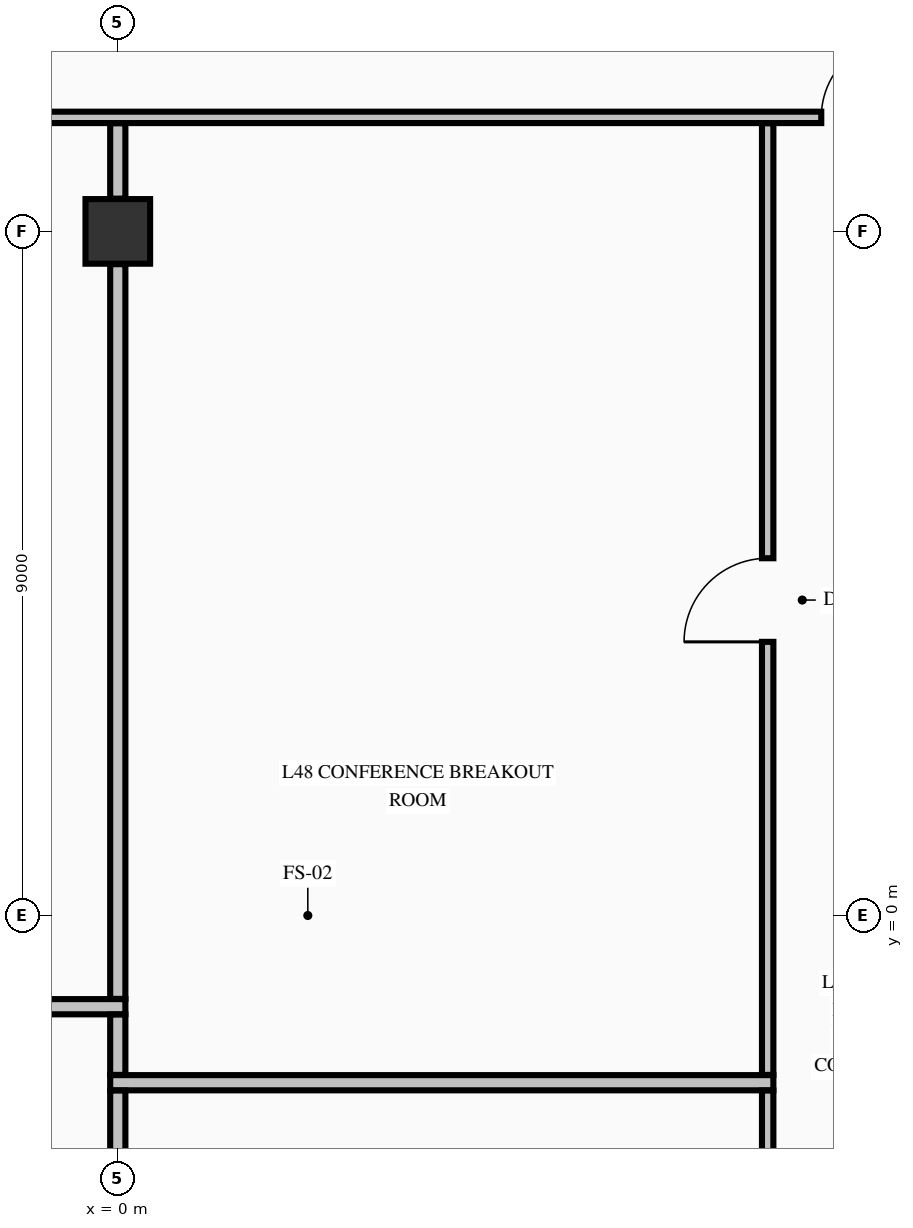
"""IFC4 building model, lengths in metres.
Left out: names, types, materials, properties, quantities, classifications, styles, units other than length and angle.
Written with IfcOpenShell. Run it as: python <this file> out.ifc"""

import sys

from ifc_helpers import new_model, si_unit, direction, frame, frame_2d, origin, origin_2d, place, context, subcontext, project, spatial, rectangle, extrude, element, fill, save


model = new_model("IFC4")
c1 = context("Model", 3, precision=1e-05, world=origin(), true_north=direction((0.0, 1.0)))
c2 = subcontext(c1, "Body", "Model", "MODEL_VIEW")
j1 = project(units=[si_unit("LENGTHUNIT", "METRE"), si_unit("PLANEANGLEUNIT", "RADIAN")], contexts=[c1])
p1 = place(None, origin())
s1 = spatial("IfcSite", under=j1, at=p1, CompositionType="ELEMENT")
p2 = place(p1, origin())
s2 = spatial("IfcBuilding", under=s1, at=p2, CompositionType="ELEMENT")
p3 = place(p2, frame((0.0, 0.0, 186.46)))
s3 = spatial("IfcBuildingStorey", under=s2, at=p3, CompositionType="ELEMENT", Elevation=186.46)
p4 = place(p3, frame((0.0, 9.0, -0.425), z_axis=(0.0, 0.0, 1.0), x_axis=(1.0, 0.0, 0.0)))
e1 = element("IfcColumn", 1, at=p4, inside=s3, PredefinedType="COLUMN", context=c2, shape_type="SweptSolid", body=[
    extrude(rectangle(XDim=0.85, YDim=0.85, at=origin_2d()), origin(), (0.0, 0.0, 1.0), 5.0),
])
for number, where, z_axis, x_axis in (
    (2, (-0.1, -2.2, 0.0), (0.0, 0.0, 1.0), (1.0, 0.0, 0.0)),
    (3, (-8.625, -1.2, 0.0), (0.0, 0.0, 1.0), (1.0, 0.0, 0.0)),
):
    element("IfcWall", number, at=place(p3, frame(where, z_axis=z_axis, x_axis=x_axis)), inside=s3, PredefinedType="PARTITIONING", context=c2, shape_type="SweptSolid", body=[
        extrude(rectangle(XDim=8.725, YDim=0.2, at=frame_2d((4.363, 0.0))), origin(), (0.0, 0.0, 1.0), 4.575),
    ])
p5 = place(p3, frame((-10.569, 10.5, 0.0), z_axis=(0.0, 0.0, 1.0), x_axis=(1.0, 0.0, 0.0)))
e4 = element("IfcWall", 4, at=p5, inside=s3, PredefinedType="PARTITIONING", context=c2, shape_type="SweptSolid", body=[
    extrude(rectangle(XDim=21.138, YDim=0.15, at=frame_2d((10.569, 0.0))), origin(), (0.0, 0.0, 1.0), 4.575),
])
p6 = place(p5, frame((0.264, 0.0, 0.0)))
e5 = element("IfcOpeningElement", 5, at=p6, cuts=e4, PredefinedType="OPENING", context=c2, shape_type="SweptSolid", body=[
    extrude(rectangle(XDim=1.05, YDim=2.15, at=frame_2d((0.525, 1.075))), frame((0.0, 0.085, 0.0), z_axis=(0.0, -1.0, 0.0), x_axis=(1.0, 0.0, 0.0)), (0.0, 0.0, 1.0), 0.17),
])
p7 = place(p5, frame((19.824, 0.0, 0.0)))
e6 = element("IfcOpeningElement", 6, at=p7, cuts=e4, PredefinedType="OPENING", context=c2, shape_type="SweptSolid", body=[
    extrude(rectangle(XDim=1.05, YDim=2.15, at=frame_2d((0.525, 1.075))), frame((0.0, 0.085, 0.0), z_axis=(0.0, -1.0, 0.0), x_axis=(1.0, 0.0, 0.0)), (0.0, 0.0, 1.0), 0.17),
])
p8 = place(p3, frame((0.0, -5.097, 0.0), z_axis=(0.0, 0.0, 1.0), x_axis=(0.0, 1.0, 0.0)))
e7 = element("IfcWall", 7, at=p8, inside=s3, PredefinedType="PARTITIONING", context=c2, shape_type="SweptSolid", body=[
    extrude(rectangle(XDim=2.794, YDim=0.2, at=frame_2d((1.397, 0.0))), origin(), (0.0, 0.0, 1.0), 3.767),
])
p9 = place(p3, frame((0.0, -2.097, 0.0), z_axis=(0.0, 0.0, 1.0), x_axis=(0.0, 1.0, 0.0)))
e8 = element("IfcWall", 8, at=p9, inside=s3, PredefinedType="PARTITIONING", context=c2, shape_type="SweptSolid", body=[
    extrude(rectangle(XDim=0.794, YDim=0.2, at=frame_2d((0.397, 0.0))), origin(), (0.0, 0.0, 1.0), 3.767),
])
p10 = place(p3, frame((0.0, -1.097, 0.0), z_axis=(0.0, 0.0, 1.0), x_axis=(0.0, 1.0, 0.0)))
e9 = element("IfcWall", 9, at=p10, inside=s3, PredefinedType="PARTITIONING", context=c2, shape_type="SweptSolid", body=[
    extrude(rectangle(XDim=9.666, YDim=0.2, at=frame_2d((4.833, 0.0))), origin(), (0.0, 0.0, 1.0), 3.767),
])
p11 = place(p3, frame((0.0, 9.431, 0.0), z_axis=(0.0, 0.0, 1.0), x_axis=(0.0, 1.0, 0.0)))
e10 = element("IfcWall", 10, at=p11, inside=s3, PredefinedType="PARTITIONING", context=c2, shape_type="SweptSolid", body=[
    extrude(rectangle(XDim=0.991, YDim=0.2, at=frame_2d((0.496, 0.0))), origin(), (0.0, 0.0, 1.0), 2.167),
])
p12 = place(p3, frame((8.55, -5.097, 0.0), z_axis=(0.0, 0.0, 1.0), x_axis=(0.0, 1.0, 0.0)))
e11 = element("IfcWall", 11, at=p12, inside=s3, PredefinedType="PARTITIONING", context=c2, shape_type="SweptSolid", body=[
    extrude(rectangle(XDim=2.794, YDim=0.15, at=frame_2d((1.397, 0.0))), origin(), (0.0, 0.0, 1.0), 4.575),
])
p13 = place(p12, frame((0.922, 0.0, 0.0)))
e12 = element("IfcOpeningElement", 12, at=p13, cuts=e11, PredefinedType="OPENING", context=c2, shape_type="SweptSolid", body=[
    extrude(rectangle(XDim=0.95, YDim=2.15, at=frame_2d((0.475, 1.075))), frame((0.0, 0.085, 0.0), z_axis=(0.0, -1.0, 0.0), x_axis=(1.0, 0.0, 0.0)), (0.0, 0.0, 1.0), 0.17),
])
p14 = place(p3, frame((8.55, -2.097, 0.0), z_axis=(0.0, 0.0, 1.0), x_axis=(0.0, 1.0, 0.0)))
e13 = element("IfcWall", 13, at=p14, inside=s3, PredefinedType="PARTITIONING", context=c2, shape_type="SweptSolid", body=[
    extrude(rectangle(XDim=12.519, YDim=0.15, at=frame_2d((6.26, 0.0))), origin(), (0.0, 0.0, 1.0), 4.575),
])
p15 = place(p14, frame((5.697, 0.0, 0.0)))
e14 = element("IfcOpeningElement", 14, at=p15, cuts=e13, PredefinedType="OPENING", context=c2, shape_type="SweptSolid", body=[
    extrude(rectangle(XDim=1.1, YDim=2.15, at=frame_2d((0.55, 1.075))), frame((0.0, 0.085, 0.0), z_axis=(0.0, -1.0, 0.0), x_axis=(1.0, 0.0, 0.0)), (0.0, 0.0, 1.0), 0.17),
])
p16 = place(p7, origin())
e15 = element("IfcDoor", 15, at=p16, inside=s3, OperationType="SINGLE_SWING_RIGHT", PredefinedType="DOOR", context=c2, shape_type="SweptSolid", body=[
    extrude(rectangle(XDim=1.05, YDim=2.15, at=frame_2d((0.525, 1.075))), frame((0.0, 0.025, 0.0), z_axis=(0.0, -1.0, 0.0), x_axis=(1.0, 0.0, 0.0)), (0.0, 0.0, 1.0), 0.05),
])
fill(e6, e15)
p17 = place(p15, origin())
e16 = element("IfcDoor", 16, at=p17, inside=s3, OperationType="SINGLE_SWING_LEFT", PredefinedType="DOOR", context=c2, shape_type="SweptSolid", body=[
    extrude(rectangle(XDim=1.1, YDim=2.15, at=frame_2d((0.55, 1.075))), frame((0.0, 0.025, 0.0), z_axis=(0.0, -1.0, 0.0), x_axis=(1.0, 0.0, 0.0)), (0.0, 0.0, 1.0), 0.05),
])
fill(e14, e16)
save(model, sys.argv[1])
